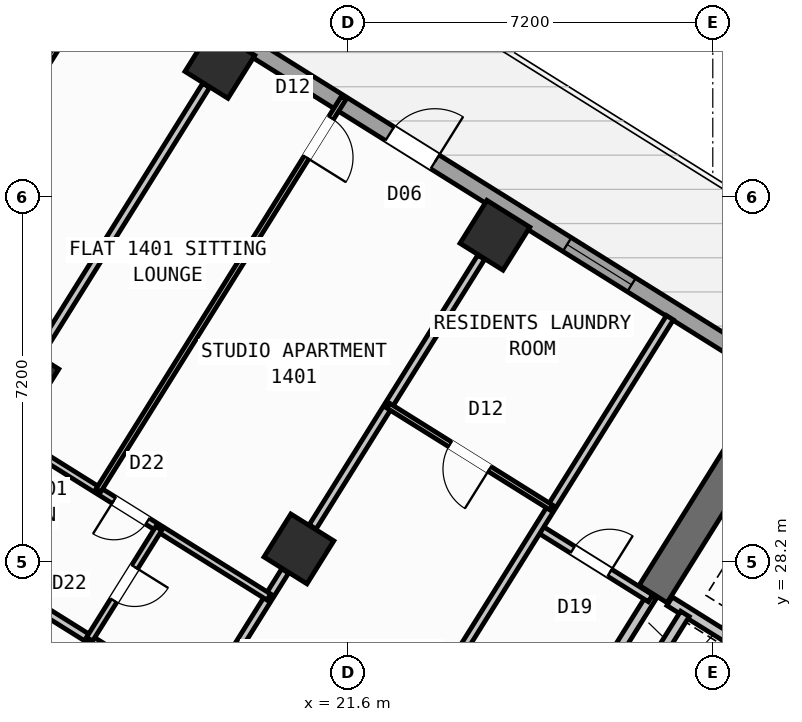
"""IFC4 building model, lengths in metres.
Left out: names, types, materials, properties, quantities, classifications, styles, units other than length and angle.
Written with IfcOpenShell. Run it as: python <this file> out.ifc"""

import sys

from ifc_helpers import new_model, si_unit, direction, frame, frame_2d, origin, origin_2d, place, context, subcontext, project, spatial, rectangle, hollow_rectangle, extrude, source, transform, mapped, element, fill, save


model = new_model("IFC4")
c1 = context("Model", 3, precision=1e-05, world=origin(), true_north=direction((0.0, 1.0)))
c2 = subcontext(c1, "Body", "Model", "MODEL_VIEW")
j1 = project(units=[si_unit("LENGTHUNIT", "METRE"), si_unit("PLANEANGLEUNIT", "RADIAN")], contexts=[c1])
p1 = place(None, origin())
s1 = spatial("IfcSite", under=j1, at=p1, CompositionType="ELEMENT")
p2 = place(p1, origin())
s2 = spatial("IfcBuilding", under=s1, at=p2, CompositionType="ELEMENT")
p3 = place(p2, frame((0.0, 0.0, 56.4)))
s3 = spatial("IfcBuildingStorey", under=s2, at=p3, CompositionType="ELEMENT", Elevation=56.4)
p4 = place(p3, frame((29.491, 30.552, 0.0), z_axis=(0.0, 0.0, 1.0), x_axis=(-0.529893103397, -0.8480644427, 0.0)))
e1 = element("IfcWall", 1, at=p4, inside=s3, PredefinedType="SHEAR", context=c2, shape_type="SweptSolid", body=[
    extrude(rectangle(XDim=3.525, YDim=0.65, at=frame_2d((1.763, 0.0))), origin(), (0.0, 0.0, 1.0), 3.35),
])
m1 = source(origin(), c2, "Body", "SweptSolid", [
    extrude(hollow_rectangle(XDim=1.0, YDim=1.0, WallThickness=0.04, at=origin_2d()), origin(), (0.0, 0.0, 1.0), 3.6),
])
for number, where, z_axis, x_axis in (
    (2, (24.5, 34.643, 0.0), (0.0, 0.0, 1.0), (-0.848, 0.53, 0.0)),
    (3, (20.632, 28.452, 0.0), (0.0, 0.0, 1.0), (-0.848, 0.53, 0.0)),
    (4, (19.073, 38.034, 0.0), (0.0, 0.0, 1.0), (-0.848, 0.53, 0.0)),
    (5, (15.205, 31.844, 0.0), (0.0, 0.0, 1.0), (-0.848, 0.53, 0.0)),
):
    element("IfcColumn", number, at=place(p3, frame(where, z_axis=z_axis, x_axis=x_axis)), inside=s3, PredefinedType="COLUMN", context=c2, shape_type="MappedRepresentation", body=[
        mapped(m1, transform((0.0, 0.0, 0.0), scale=1.0)),
    ])
p5 = place(p3, frame((14.138, 41.825, 0.0), z_axis=(0.0, 0.0, 1.0), x_axis=(0.848046498049, -0.529921821731, 0.0)))
e6 = element("IfcWall", 6, at=p5, inside=s3, PredefinedType="STANDARD", context=c2, shape_type="SweptSolid", body=[
    extrude(rectangle(XDim=31.588, YDim=0.32, at=frame_2d((15.794, 0.0))), origin(), (0.0, 0.0, 1.0), 3.35),
])
p6 = place(p5, frame((9.772, 0.0, 0.0)))
e7 = element("IfcOpeningElement", 7, at=p6, cuts=e6, PredefinedType="OPENING", context=c2, shape_type="SweptSolid", body=[
    extrude(rectangle(XDim=1.05, YDim=2.15, at=frame_2d((0.525, 1.075))), frame((0.0, 0.17, 0.0), z_axis=(0.0, -1.0, 0.0), x_axis=(1.0, 0.0, 0.0)), (0.0, 0.0, 1.0), 0.34),
])
p7 = place(p5, frame((0.966, 0.0, 0.85)))
e8 = element("IfcOpeningElement", 8, at=p7, cuts=e6, PredefinedType="OPENING", context=c2, shape_type="SweptSolid", body=[
    extrude(rectangle(XDim=1.5, YDim=1.5, at=frame_2d((0.75, 0.75))), frame((0.0, 0.17, 0.0), z_axis=(0.0, -1.0, 0.0), x_axis=(1.0, 0.0, 0.0)), (0.0, 0.0, 1.0), 0.34),
])
p8 = place(p5, frame((4.121, 0.0, 1.0)))
e9 = element("IfcOpeningElement", 9, at=p8, cuts=e6, PredefinedType="OPENING", context=c2, shape_type="SweptSolid", body=[
    extrude(rectangle(XDim=0.9, YDim=1.25, at=frame_2d((0.45, 0.625))), frame((0.0, 0.17, 0.0), z_axis=(0.0, -1.0, 0.0), x_axis=(1.0, 0.0, 0.0)), (0.0, 0.0, 1.0), 0.34),
])
p9 = place(p5, frame((13.899, 0.0, 0.85)))
e10 = element("IfcOpeningElement", 10, at=p9, cuts=e6, PredefinedType="OPENING", context=c2, shape_type="SweptSolid", body=[
    extrude(rectangle(XDim=1.5, YDim=1.5, at=frame_2d((0.75, 0.75))), frame((0.0, 0.17, 0.0), z_axis=(0.0, -1.0, 0.0), x_axis=(1.0, 0.0, 0.0)), (0.0, 0.0, 1.0), 0.34),
])
p10 = place(p5, frame((22.019, 0.0, 0.95)))
e11 = element("IfcOpeningElement", 11, at=p10, cuts=e6, PredefinedType="OPENING", context=c2, shape_type="SweptSolid", body=[
    extrude(rectangle(XDim=1.2, YDim=1.4, at=frame_2d((0.6, 0.7))), frame((0.0, 0.17, 0.0), z_axis=(0.0, -1.0, 0.0), x_axis=(1.0, 0.0, 0.0)), (0.0, 0.0, 1.0), 0.34),
])
p11 = place(p5, frame((27.569, 0.0, 0.95)))
e12 = element("IfcOpeningElement", 12, at=p11, cuts=e6, PredefinedType="OPENING", context=c2, shape_type="SweptSolid", body=[
    extrude(rectangle(XDim=1.2, YDim=1.4, at=frame_2d((0.6, 0.7))), frame((0.0, 0.17, 0.0), z_axis=(0.0, -1.0, 0.0), x_axis=(1.0, 0.0, 0.0)), (0.0, 0.0, 1.0), 0.34),
])
p12 = place(p3, frame((31.822, 24.998, 0.0), z_axis=(0.0, 0.0, 1.0), x_axis=(-0.848058348634, 0.529902856485, 0.0)))
e13 = element("IfcWall", 13, at=p12, inside=s3, PredefinedType="STANDARD", context=c2, shape_type="SweptSolid", body=[
    extrude(rectangle(XDim=4.568, YDim=0.2, at=frame_2d((2.284, 0.0))), origin(), (0.0, 0.0, 1.0), 3.34),
])
p13 = place(p3, frame((28.25, 27.17, 0.0), z_axis=(0.0, 0.0, 1.0), x_axis=(-0.529905827651, -0.848056492117, 0.0)))
e14 = element("IfcWall", 14, at=p13, inside=s3, PredefinedType="STANDARD", context=c2, shape_type="SweptSolid", body=[
    extrude(rectangle(XDim=1.65, YDim=0.2, at=frame_2d((0.825, 0.0))), origin(), (0.0, 0.0, 1.0), 3.34),
])
p14 = place(p3, frame((27.596, 27.52, 0.0), z_axis=(0.0, 0.0, 1.0), x_axis=(-0.529865479138, -0.848081702443, 0.0)))
e15 = element("IfcWall", 15, at=p14, inside=s3, PredefinedType="STANDARD", context=c2, shape_type="SweptSolid", body=[
    extrude(rectangle(XDim=2.96, YDim=0.2, at=frame_2d((1.48, 0.0))), origin(), (0.0, 0.0, 1.0), 3.34),
])
p15 = place(p14, frame((1.76, 0.0, 0.0)))
e16 = element("IfcOpeningElement", 16, at=p15, cuts=e15, PredefinedType="OPENING", context=c2, shape_type="SweptSolid", body=[
    extrude(rectangle(XDim=0.86, YDim=2.05, at=frame_2d((0.43, 1.025))), frame((0.0, 0.11, 0.0), z_axis=(0.0, -1.0, 0.0), x_axis=(1.0, 0.0, 0.0)), (0.0, 0.0, 1.0), 0.22),
])
p16 = place(p3, frame((27.57, 27.478, 0.0), z_axis=(0.0, 0.0, 1.0), x_axis=(-0.848050851465, 0.529914854792, 0.0)))
e17 = element("IfcWall", 17, at=p16, inside=s3, PredefinedType="PARTITIONING", context=c2, shape_type="SweptSolid", body=[
    extrude(rectangle(XDim=2.61, YDim=0.16, at=frame_2d((1.305, 0.0))), origin(), (0.0, 0.0, 1.0), 3.34),
])
p17 = place(p16, frame((0.95, 0.0, 0.0)))
e18 = element("IfcOpeningElement", 18, at=p17, cuts=e17, PredefinedType="OPENING", context=c2, shape_type="SweptSolid", body=[
    extrude(rectangle(XDim=0.86, YDim=2.05, at=frame_2d((0.43, 1.025))), frame((0.0, 0.09, 0.0), z_axis=(0.0, -1.0, 0.0), x_axis=(1.0, 0.0, 0.0)), (0.0, 0.0, 1.0), 0.18),
])
p18 = place(p3, frame((27.953, 33.016, 0.0), z_axis=(0.0, 0.0, 1.0), x_axis=(-0.529905022231, -0.848056995381, 0.0)))
e19 = element("IfcWall", 19, at=p18, inside=s3, PredefinedType="PARTITIONING", context=c2, shape_type="SweptSolid", body=[
    extrude(rectangle(XDim=11.45, YDim=0.16, at=frame_2d((5.725, 0.0))), origin(), (0.0, 0.0, 1.0), 3.34),
])
p19 = place(p3, frame((21.885, 23.306, 0.0), z_axis=(0.0, 0.0, 1.0), x_axis=(-0.848052408131, 0.529912363569, 0.0)))
e20 = element("IfcWall", 20, at=p19, inside=s3, PredefinedType="PARTITIONING", context=c2, shape_type="SweptSolid", body=[
    extrude(rectangle(XDim=16.73, YDim=0.16, at=frame_2d((8.365, 0.0))), origin(), (0.0, 0.0, 1.0), 3.34),
])
p20 = place(p19, frame((1.395, 0.0, 0.0)))
e21 = element("IfcOpeningElement", 21, at=p20, cuts=e20, PredefinedType="OPENING", context=c2, shape_type="SweptSolid", body=[
    extrude(rectangle(XDim=1.0, YDim=2.1, at=frame_2d((0.5, 1.05))), frame((0.0, 0.09, 0.0), z_axis=(0.0, -1.0, 0.0), x_axis=(1.0, 0.0, 0.0)), (0.0, 0.0, 1.0), 0.18),
])
p21 = place(p19, frame((7.82, 0.0, 0.0)))
e22 = element("IfcOpeningElement", 22, at=p21, cuts=e20, PredefinedType="OPENING", context=c2, shape_type="SweptSolid", body=[
    extrude(rectangle(XDim=1.0, YDim=2.1, at=frame_2d((0.5, 1.05))), frame((0.0, 0.09, 0.0), z_axis=(0.0, -1.0, 0.0), x_axis=(1.0, 0.0, 0.0)), (0.0, 0.0, 1.0), 0.18),
])
p22 = place(p19, frame((11.14, 0.0, 0.0)))
e23 = element("IfcOpeningElement", 23, at=p22, cuts=e20, PredefinedType="OPENING", context=c2, shape_type="SweptSolid", body=[
    extrude(rectangle(XDim=1.0, YDim=2.1, at=frame_2d((0.5, 1.05))), frame((0.0, 0.09, 0.0), z_axis=(0.0, -1.0, 0.0), x_axis=(1.0, 0.0, 0.0)), (0.0, 0.0, 1.0), 0.18),
])
p23 = place(p3, frame((20.719, 21.44, 0.0), z_axis=(0.0, 0.0, 1.0), x_axis=(-0.848048310262, 0.529918921593, 0.0)))
e24 = element("IfcWall", 24, at=p23, inside=s3, PredefinedType="PARTITIONING", context=c2, shape_type="SweptSolid", body=[
    extrude(rectangle(XDim=16.73, YDim=0.16, at=frame_2d((8.365, 0.0))), origin(), (0.0, 0.0, 1.0), 3.34),
])
p24 = place(p23, frame((0.92, 0.0, 0.0)))
e25 = element("IfcOpeningElement", 25, at=p24, cuts=e24, PredefinedType="OPENING", context=c2, shape_type="SweptSolid", body=[
    extrude(rectangle(XDim=1.0, YDim=2.1, at=frame_2d((0.5, 1.05))), frame((0.0, 0.09, 0.0), z_axis=(0.0, -1.0, 0.0), x_axis=(1.0, 0.0, 0.0)), (0.0, 0.0, 1.0), 0.18),
])
p25 = place(p23, frame((4.408, 0.0, 0.0)))
e26 = element("IfcOpeningElement", 26, at=p25, cuts=e24, PredefinedType="OPENING", context=c2, shape_type="SweptSolid", body=[
    extrude(rectangle(XDim=1.0, YDim=2.1, at=frame_2d((0.5, 1.05))), frame((0.0, 0.09, 0.0), z_axis=(0.0, -1.0, 0.0), x_axis=(1.0, 0.0, 0.0)), (0.0, 0.0, 1.0), 0.18),
])
p26 = place(p23, frame((7.271, 0.0, 0.0)))
e27 = element("IfcOpeningElement", 27, at=p26, cuts=e24, PredefinedType="OPENING", context=c2, shape_type="SweptSolid", body=[
    extrude(rectangle(XDim=1.0, YDim=2.1, at=frame_2d((0.5, 1.05))), frame((0.0, 0.09, 0.0), z_axis=(0.0, -1.0, 0.0), x_axis=(1.0, 0.0, 0.0)), (0.0, 0.0, 1.0), 0.18),
])
p27 = place(p23, frame((10.78, 0.0, 0.0)))
e28 = element("IfcOpeningElement", 28, at=p27, cuts=e24, PredefinedType="OPENING", context=c2, shape_type="SweptSolid", body=[
    extrude(rectangle(XDim=1.0, YDim=2.1, at=frame_2d((0.5, 1.05))), frame((0.0, 0.09, 0.0), z_axis=(0.0, -1.0, 0.0), x_axis=(1.0, 0.0, 0.0)), (0.0, 0.0, 1.0), 0.18),
])
p28 = place(p23, frame((14.372, 0.0, 0.0)))
e29 = element("IfcOpeningElement", 29, at=p28, cuts=e24, PredefinedType="OPENING", context=c2, shape_type="SweptSolid", body=[
    extrude(rectangle(XDim=1.0, YDim=2.1, at=frame_2d((0.5, 1.05))), frame((0.0, 0.09, 0.0), z_axis=(0.0, -1.0, 0.0), x_axis=(1.0, 0.0, 0.0)), (0.0, 0.0, 1.0), 0.18),
])
p29 = place(p3, frame((24.229, 34.209, 0.0), z_axis=(0.0, 0.0, 1.0), x_axis=(-0.529897533635, -0.848061674554, 0.0)))
e30 = element("IfcWall", 30, at=p29, inside=s3, PredefinedType="PARTITIONING", context=c2, shape_type="SweptSolid", body=[
    extrude(rectangle(XDim=6.276, YDim=0.16, at=frame_2d((3.138, 0.0))), origin(), (0.0, 0.0, 1.0), 2.725),
])
p30 = place(p3, frame((20.361, 28.018, 0.0), z_axis=(0.0, 0.0, 1.0), x_axis=(-0.529875025416, -0.848075738033, 0.0)))
e31 = element("IfcWall", 31, at=p30, inside=s3, PredefinedType="PARTITIONING", context=c2, shape_type="SweptSolid", body=[
    extrude(rectangle(XDim=3.188, YDim=0.16, at=frame_2d((1.594, 0.0))), origin(), (0.0, 0.0, 1.0), 2.725),
])
p31 = place(p3, frame((25.612, 29.269, 0.0), z_axis=(0.0, 0.0, 1.0), x_axis=(-0.84803087207, 0.529946827537, 0.0)))
e32 = element("IfcWall", 32, at=p31, inside=s3, PredefinedType="PARTITIONING", context=c2, shape_type="SweptSolid", body=[
    extrude(rectangle(XDim=3.79, YDim=0.11, at=frame_2d((1.895, 0.0))), origin(), (0.0, 0.0, 1.0), 3.34),
])
p32 = place(p31, frame((1.435, 0.0, 0.0)))
e33 = element("IfcOpeningElement", 33, at=p32, cuts=e32, PredefinedType="OPENING", context=c2, shape_type="SweptSolid", body=[
    extrude(rectangle(XDim=0.92, YDim=2.08, at=frame_2d((0.46, 1.04))), frame((0.0, 0.065, 0.0), z_axis=(0.0, -1.0, 0.0), x_axis=(1.0, 0.0, 0.0)), (0.0, 0.0, 1.0), 0.13),
])
p33 = place(p3, frame((18.802, 37.6, 0.0), z_axis=(0.0, 0.0, 1.0), x_axis=(-0.529915015264, -0.848050751193, 0.0)))
e34 = element("IfcWall", 34, at=p33, inside=s3, PredefinedType="PARTITIONING", context=c2, shape_type="SweptSolid", body=[
    extrude(rectangle(XDim=6.276, YDim=0.16, at=frame_2d((3.138, 0.0))), origin(), (0.0, 0.0, 1.0), 2.725),
])
p34 = place(p3, frame((20.039, 27.502, 0.0), z_axis=(0.0, 0.0, 1.0), x_axis=(-0.848039019877, 0.529933789039, 0.0)))
e35 = element("IfcWall", 35, at=p34, inside=s3, PredefinedType="PLUMBINGWALL", context=c2, shape_type="SweptSolid", body=[
    extrude(rectangle(XDim=6.4, YDim=0.14, at=frame_2d((3.2, 0.0))), origin(), (0.0, 0.0, 1.0), 3.34),
])
p35 = place(p34, frame((2.824, 0.0, 0.0)))
e36 = element("IfcOpeningElement", 36, at=p35, cuts=e35, PredefinedType="OPENING", context=c2, shape_type="SweptSolid", body=[
    extrude(rectangle(XDim=0.78, YDim=2.05, at=frame_2d((0.39, 1.025))), frame((0.0, 0.08, 0.0), z_axis=(0.0, -1.0, 0.0), x_axis=(1.0, 0.0, 0.0)), (0.0, 0.0, 1.0), 0.16),
])
p36 = place(p3, frame((17.867, 28.859, 0.0), z_axis=(0.0, 0.0, 1.0), x_axis=(-0.529913878929, -0.848051461244, 0.0)))
e37 = element("IfcWall", 37, at=p36, inside=s3, PredefinedType="PLUMBINGWALL", context=c2, shape_type="SweptSolid", body=[
    extrude(rectangle(XDim=2.58, YDim=0.14, at=frame_2d((1.29, 0.0))), origin(), (0.0, 0.0, 1.0), 3.34),
])
p37 = place(p36, frame((0.9, 0.0, 0.0)))
e38 = element("IfcOpeningElement", 38, at=p37, cuts=e37, PredefinedType="OPENING", context=c2, shape_type="SweptSolid", body=[
    extrude(rectangle(XDim=0.78, YDim=2.05, at=frame_2d((0.39, 1.025))), frame((0.0, 0.08, 0.0), z_axis=(0.0, -1.0, 0.0), x_axis=(1.0, 0.0, 0.0)), (0.0, 0.0, 1.0), 0.16),
])
p38 = place(p3, frame((21.517, 37.356, 0.0), z_axis=(0.0, 0.0, 1.0), x_axis=(-0.529919705034, -0.848047820713, 0.0)))
e39 = element("IfcWall", 39, at=p38, inside=s3, PredefinedType="PARTITIONING", context=c2, shape_type="SweptSolid", body=[
    extrude(rectangle(XDim=9.14, YDim=0.11, at=frame_2d((4.57, 0.0))), origin(), (0.0, 0.0, 1.0), 3.34),
])
p39 = place(p38, frame((0.47, 0.0, 0.0)))
e40 = element("IfcOpeningElement", 40, at=p39, cuts=e39, PredefinedType="OPENING", context=c2, shape_type="SweptSolid", body=[
    extrude(rectangle(XDim=0.92, YDim=2.08, at=frame_2d((0.46, 1.04))), frame((0.0, 0.065, 0.0), z_axis=(0.0, -1.0, 0.0), x_axis=(1.0, 0.0, 0.0)), (0.0, 0.0, 1.0), 0.13),
])
p40 = place(p3, frame((16.995, 40.182, 0.0), z_axis=(0.0, 0.0, 1.0), x_axis=(-0.529927783988, -0.848042772363, 0.0)))
e41 = element("IfcWall", 41, at=p40, inside=s3, PredefinedType="PARTITIONING", context=c2, shape_type="SweptSolid", body=[
    extrude(rectangle(XDim=11.72, YDim=0.11, at=frame_2d((5.86, 0.0))), origin(), (0.0, 0.0, 1.0), 3.34),
])
p41 = place(p40, frame((10.08, 0.0, 0.0)))
e42 = element("IfcOpeningElement", 42, at=p41, cuts=e41, PredefinedType="OPENING", context=c2, shape_type="SweptSolid", body=[
    extrude(rectangle(XDim=0.78, YDim=2.05, at=frame_2d((0.39, 1.025))), frame((0.0, 0.065, 0.0), z_axis=(0.0, -1.0, 0.0), x_axis=(1.0, 0.0, 0.0)), (0.0, 0.0, 1.0), 0.13),
])
p42 = place(p40, frame((4.2, 0.0, 0.0)))
e43 = element("IfcOpeningElement", 43, at=p42, cuts=e41, PredefinedType="OPENING", context=c2, shape_type="SweptSolid", body=[
    extrude(rectangle(XDim=0.92, YDim=2.08, at=frame_2d((0.46, 1.04))), frame((0.0, 0.065, 0.0), z_axis=(0.0, -1.0, 0.0), x_axis=(1.0, 0.0, 0.0)), (0.0, 0.0, 1.0), 0.13),
])
m2 = source(origin(), c2, "Body", "SweptSolid", [
    extrude(rectangle(XDim=1.05, YDim=2.15, at=frame_2d((0.525, 1.075))), frame((0.0, 0.025, 0.0), z_axis=(0.0, -1.0, 0.0), x_axis=(1.0, 0.0, 0.0)), (0.0, 0.0, 1.0), 0.05),
])
p43 = place(p6, origin())
e44 = element("IfcDoor", 44, at=p43, inside=s3, OperationType="SINGLE_SWING_RIGHT", PredefinedType="DOOR", context=c2, shape_type="MappedRepresentation", body=[
    mapped(m2, transform((0.0, 0.0, 0.0), scale=1.0)),
])
fill(e7, e44)
m3 = source(origin(), c2, "Body", "SweptSolid", [
    extrude(rectangle(XDim=1.5, YDim=1.5, at=frame_2d((0.75, 0.75))), frame((0.0, 0.03, 0.0), z_axis=(0.0, -1.0, 0.0), x_axis=(1.0, 0.0, 0.0)), (0.0, 0.0, 1.0), 0.06),
])
p44 = place(p9, origin())
e45 = element("IfcWindow", 45, at=p44, inside=s3, PartitioningType="SINGLE_PANEL", PredefinedType="WINDOW", context=c2, shape_type="MappedRepresentation", body=[
    mapped(m3, transform((0.0, 0.0, 0.0), scale=1.0)),
])
fill(e10, e45)
m4 = source(origin(), c2, "Body", "SweptSolid", [
    extrude(rectangle(XDim=0.86, YDim=2.05, at=frame_2d((0.43, 1.025))), frame((0.0, 0.025, 0.0), z_axis=(0.0, -1.0, 0.0), x_axis=(1.0, 0.0, 0.0)), (0.0, 0.0, 1.0), 0.05),
])
p45 = place(p17, frame((0.86, 0.0, 0.0), z_axis=(0.0, 0.0, 1.0), x_axis=(-1.0, 0.0, 0.0)))
e46 = element("IfcDoor", 46, at=p45, inside=s3, OperationType="SINGLE_SWING_RIGHT", PredefinedType="DOOR", context=c2, shape_type="MappedRepresentation", body=[
    mapped(m4, transform((0.0, 0.0, 0.0), scale=1.0)),
])
fill(e18, e46)
m5 = source(origin(), c2, "Body", "SweptSolid", [
    extrude(rectangle(XDim=0.92, YDim=2.08, at=frame_2d((0.46, 1.04))), frame((0.0, 0.025, 0.0), z_axis=(0.0, -1.0, 0.0), x_axis=(1.0, 0.0, 0.0)), (0.0, 0.0, 1.0), 0.05),
])
p46 = place(p32, origin())
e47 = element("IfcDoor", 47, at=p46, inside=s3, OperationType="SINGLE_SWING_LEFT", PredefinedType="DOOR", context=c2, shape_type="MappedRepresentation", body=[
    mapped(m5, transform((0.0, 0.0, 0.0), scale=1.0)),
])
fill(e33, e47)
p47 = place(p39, origin())
e48 = element("IfcDoor", 48, at=p47, inside=s3, OperationType="SINGLE_SWING_RIGHT", PredefinedType="DOOR", context=c2, shape_type="MappedRepresentation", body=[
    mapped(m5, transform((0.0, 0.0, 0.0), scale=1.0)),
])
fill(e40, e48)
m6 = source(origin(), c2, "Body", "SweptSolid", [
    extrude(rectangle(XDim=0.78, YDim=2.05, at=frame_2d((0.39, 1.025))), frame((0.0, 0.025, 0.0), z_axis=(0.0, -1.0, 0.0), x_axis=(1.0, 0.0, 0.0)), (0.0, 0.0, 1.0), 0.05),
])
p48 = place(p35, origin())
e49 = element("IfcDoor", 49, at=p48, inside=s3, OperationType="SINGLE_SWING_RIGHT", PredefinedType="DOOR", context=c2, shape_type="MappedRepresentation", body=[
    mapped(m6, transform((0.0, 0.0, 0.0), scale=1.0)),
])
fill(e36, e49)
p49 = place(p37, origin())
e50 = element("IfcDoor", 50, at=p49, inside=s3, OperationType="SINGLE_SWING_LEFT", PredefinedType="DOOR", context=c2, shape_type="MappedRepresentation", body=[
    mapped(m6, transform((0.0, 0.0, 0.0), scale=1.0)),
])
fill(e38, e50)
save(model, sys.argv[1])
